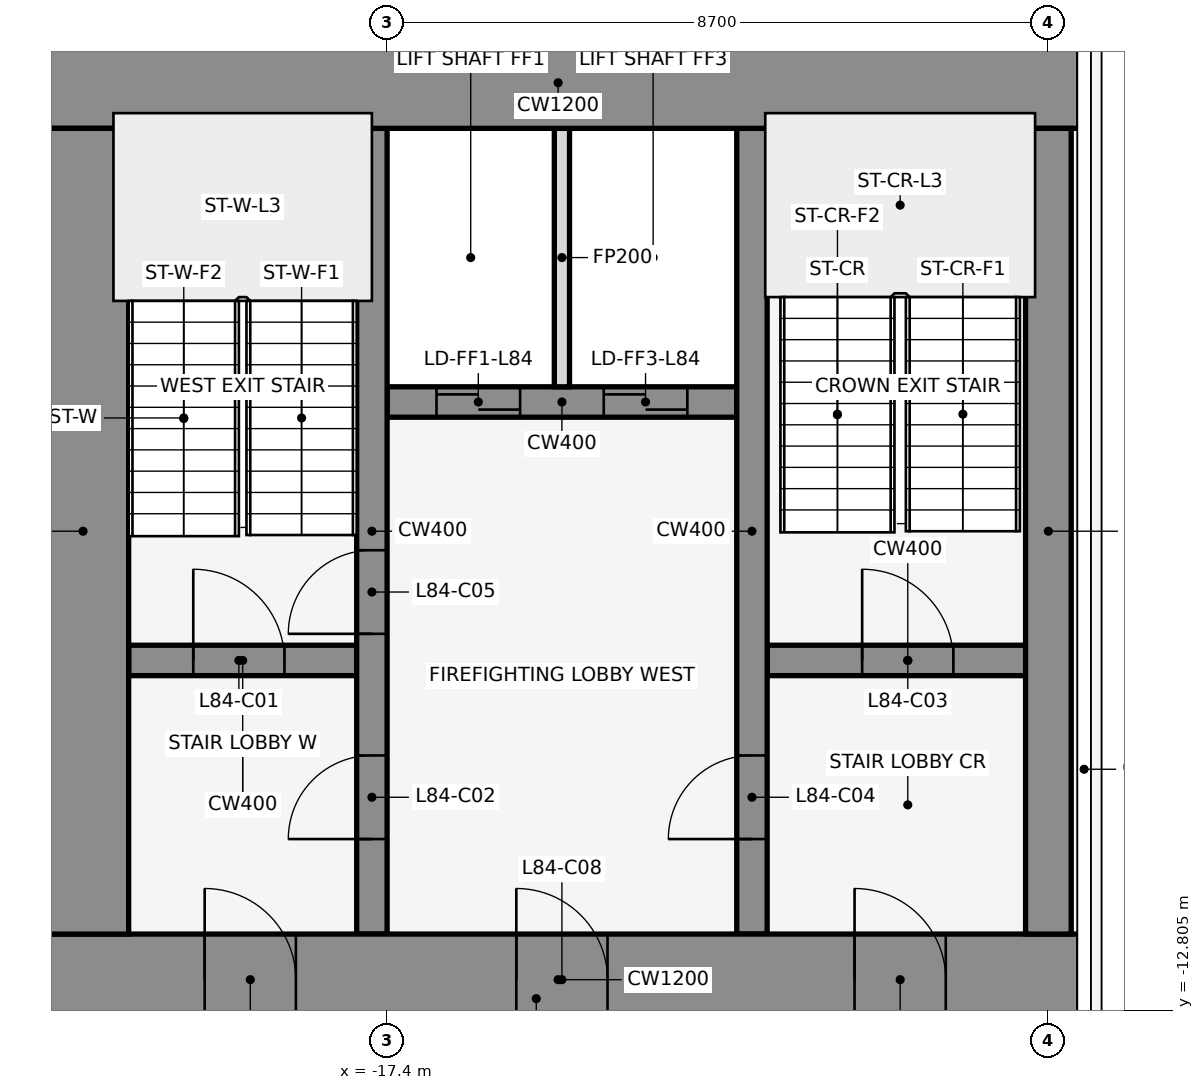
"""IFC4 building model, lengths in metres.
Left out: names, types, materials, properties, quantities, classifications, styles, units other than length and angle.
Written with IfcOpenShell. Run it as: python <this file> out.ifc"""

import sys

from ifc_helpers import new_model, si_unit, direction, frame, frame_2d, origin, place, context, subcontext, project, spatial, rectangle, extrude, element, fill, save


model = new_model("IFC4")
c1 = context("Model", 3, precision=1e-05, world=origin(), true_north=direction((0.0, 1.0)))
c2 = subcontext(c1, "Body", "Model", "MODEL_VIEW")
j1 = project(units=[si_unit("LENGTHUNIT", "METRE"), si_unit("PLANEANGLEUNIT", "RADIAN")], contexts=[c1])
p1 = place(None, origin())
s1 = spatial("IfcSite", under=j1, at=p1, CompositionType="ELEMENT")
p2 = place(p1, origin())
s2 = spatial("IfcBuilding", under=s1, at=p2, CompositionType="ELEMENT")
p3 = place(p2, frame((0.0, 0.0, 374.9)))
s3 = spatial("IfcBuildingStorey", under=s2, at=p3, CompositionType="ELEMENT", Elevation=374.9)
p4 = place(p3, frame((-20.8, -8.2, 0.0), z_axis=(0.0, 0.0, 1.0), x_axis=(1.0, 0.0, 0.0)))
e1 = element("IfcWall", 1, at=p4, inside=s3, PredefinedType="SHEAR", context=c2, shape_type="SweptSolid", body=[
    extrude(rectangle(XDim=3.0, YDim=0.4, at=frame_2d((1.5, 0.0))), origin(), (0.0, 0.0, 1.0), 4.5),
])
p5 = place(p4, frame((0.85, 0.0, 0.0)))
e2 = element("IfcOpeningElement", 2, at=p5, cuts=e1, PredefinedType="OPENING", context=c2, shape_type="SweptSolid", body=[
    extrude(rectangle(XDim=1.2, YDim=2.1, at=frame_2d((0.6, 1.05))), frame((0.0, 0.212, 0.0), z_axis=(0.0, -1.0, 0.0), x_axis=(1.0, 0.0, 0.0)), (0.0, 0.0, 1.0), 0.424),
])
p6 = place(p3, frame((-12.4, -8.2, 0.0), z_axis=(0.0, 0.0, 1.0), x_axis=(1.0, 0.0, 0.0)))
e3 = element("IfcWall", 3, at=p6, inside=s3, PredefinedType="SHEAR", context=c2, shape_type="SweptSolid", body=[
    extrude(rectangle(XDim=3.7, YDim=0.4, at=frame_2d((1.85, 0.0))), origin(), (0.0, 0.0, 1.0), 4.5),
])
p7 = place(p6, frame((1.25, 0.0, 0.0)))
e4 = element("IfcOpeningElement", 4, at=p7, cuts=e3, PredefinedType="OPENING", context=c2, shape_type="SweptSolid", body=[
    extrude(rectangle(XDim=1.2, YDim=2.1, at=frame_2d((0.6, 1.05))), frame((0.0, 0.212, 0.0), z_axis=(0.0, -1.0, 0.0), x_axis=(1.0, 0.0, 0.0)), (0.0, 0.0, 1.0), 0.424),
])
p8 = place(p3, frame((-17.4, -4.8, 0.0), z_axis=(0.0, 0.0, 1.0), x_axis=(1.0, 0.0, 0.0)))
e5 = element("IfcWall", 5, at=p8, inside=s3, PredefinedType="SHEAR", context=c2, shape_type="SweptSolid", body=[
    extrude(rectangle(XDim=4.6, YDim=0.4, at=frame_2d((2.3, 0.0))), origin(), (0.0, 0.0, 1.0), 4.5),
])
p9 = place(p8, frame((0.65, 0.0, 0.0)))
e6 = element("IfcOpeningElement", 6, at=p9, cuts=e5, PredefinedType="OPENING", context=c2, shape_type="SweptSolid", body=[
    extrude(rectangle(XDim=1.1, YDim=2.1, at=frame_2d((0.55, 1.05))), frame((0.0, 0.212, 0.0), z_axis=(0.0, -1.0, 0.0), x_axis=(1.0, 0.0, 0.0)), (0.0, 0.0, 1.0), 0.424),
])
p10 = place(p8, frame((2.85, 0.0, 0.0)))
e7 = element("IfcOpeningElement", 7, at=p10, cuts=e5, PredefinedType="OPENING", context=c2, shape_type="SweptSolid", body=[
    extrude(rectangle(XDim=1.1, YDim=2.1, at=frame_2d((0.55, 1.05))), frame((0.0, 0.212, 0.0), z_axis=(0.0, -1.0, 0.0), x_axis=(1.0, 0.0, 0.0)), (0.0, 0.0, 1.0), 0.424),
])
p11 = place(p3, frame((-17.6, -11.8, 0.0), z_axis=(0.0, 0.0, 1.0), x_axis=(0.0, 1.0, 0.0)))
e8 = element("IfcWall", 8, at=p11, inside=s3, PredefinedType="SHEAR", context=c2, shape_type="SweptSolid", body=[
    extrude(rectangle(XDim=10.6, YDim=0.4, at=frame_2d((5.3, 0.0))), origin(), (0.0, 0.0, 1.0), 4.5),
])
p12 = place(p11, frame((1.25, 0.0, 0.0)))
e9 = element("IfcOpeningElement", 9, at=p12, cuts=e8, PredefinedType="OPENING", context=c2, shape_type="SweptSolid", body=[
    extrude(rectangle(XDim=1.1, YDim=2.1, at=frame_2d((0.55, 1.05))), frame((0.0, 0.212, 0.0), z_axis=(0.0, -1.0, 0.0), x_axis=(1.0, 0.0, 0.0)), (0.0, 0.0, 1.0), 0.424),
])
p13 = place(p11, frame((3.95, 0.0, 0.0)))
e10 = element("IfcOpeningElement", 10, at=p13, cuts=e8, PredefinedType="OPENING", context=c2, shape_type="SweptSolid", body=[
    extrude(rectangle(XDim=1.1, YDim=2.1, at=frame_2d((0.55, 1.05))), frame((0.0, 0.212, 0.0), z_axis=(0.0, -1.0, 0.0), x_axis=(1.0, 0.0, 0.0)), (0.0, 0.0, 1.0), 0.424),
])
p14 = place(p3, frame((-15.1, -4.6, 0.0), z_axis=(0.0, 0.0, 1.0), x_axis=(0.0, 1.0, 0.0)))
e11 = element("IfcWall", 11, at=p14, inside=s3, PredefinedType="PARTITIONING", context=c2, shape_type="SweptSolid", body=[
    extrude(rectangle(XDim=3.4, YDim=0.2, at=frame_2d((1.7, 0.0))), origin(), (0.0, 0.0, 1.0), 3.368),
])
p15 = place(p3, frame((-12.6, -11.8, 0.0), z_axis=(0.0, 0.0, 1.0), x_axis=(0.0, 1.0, 0.0)))
e12 = element("IfcWall", 12, at=p15, inside=s3, PredefinedType="SHEAR", context=c2, shape_type="SweptSolid", body=[
    extrude(rectangle(XDim=10.6, YDim=0.4, at=frame_2d((5.3, 0.0))), origin(), (0.0, 0.0, 1.0), 4.5),
])
p16 = place(p15, frame((1.25, 0.0, 0.0)))
e13 = element("IfcOpeningElement", 13, at=p16, cuts=e12, PredefinedType="OPENING", context=c2, shape_type="SweptSolid", body=[
    extrude(rectangle(XDim=1.1, YDim=2.1, at=frame_2d((0.55, 1.05))), frame((0.0, 0.212, 0.0), z_axis=(0.0, -1.0, 0.0), x_axis=(1.0, 0.0, 0.0)), (0.0, 0.0, 1.0), 0.424),
])
p17 = place(p3, frame((-22.0, -0.6, 0.0), z_axis=(0.0, 0.0, 1.0), x_axis=(1.0, 0.0, 0.0)))
e14 = element("IfcWall", 14, at=p17, inside=s3, PredefinedType="SHEAR", context=c2, shape_type="SweptSolid", body=[
    extrude(rectangle(XDim=13.7, YDim=1.2, at=frame_2d((6.85, 0.0))), origin(), (0.0, 0.0, 1.0), 4.5),
])
p18 = place(p3, frame((-22.0, -12.4, 0.0), z_axis=(0.0, 0.0, 1.0), x_axis=(1.0, 0.0, 0.0)))
e15 = element("IfcWall", 15, at=p18, inside=s3, PredefinedType="SHEAR", context=c2, shape_type="SweptSolid", body=[
    extrude(rectangle(XDim=13.7, YDim=1.2, at=frame_2d((6.85, 0.0))), origin(), (0.0, 0.0, 1.0), 4.5),
])
p19 = place(p18, frame((2.2, 0.0, 0.0)))
e16 = element("IfcOpeningElement", 16, at=p19, cuts=e15, PredefinedType="OPENING", context=c2, shape_type="SweptSolid", body=[
    extrude(rectangle(XDim=1.2, YDim=2.1, at=frame_2d((0.6, 1.05))), frame((0.0, 0.612, 0.0), z_axis=(0.0, -1.0, 0.0), x_axis=(1.0, 0.0, 0.0)), (0.0, 0.0, 1.0), 1.224),
])
p20 = place(p18, frame((10.75, 0.0, 0.0)))
e17 = element("IfcOpeningElement", 17, at=p20, cuts=e15, PredefinedType="OPENING", context=c2, shape_type="SweptSolid", body=[
    extrude(rectangle(XDim=1.2, YDim=2.1, at=frame_2d((0.6, 1.05))), frame((0.0, 0.612, 0.0), z_axis=(0.0, -1.0, 0.0), x_axis=(1.0, 0.0, 0.0)), (0.0, 0.0, 1.0), 1.224),
])
p21 = place(p18, frame((6.3, 0.0, 0.0)))
e18 = element("IfcOpeningElement", 18, at=p21, cuts=e15, PredefinedType="OPENING", context=c2, shape_type="SweptSolid", body=[
    extrude(rectangle(XDim=1.2, YDim=2.1, at=frame_2d((0.6, 1.05))), frame((0.0, 0.612, 0.0), z_axis=(0.0, -1.0, 0.0), x_axis=(1.0, 0.0, 0.0)), (0.0, 0.0, 1.0), 1.224),
])
p22 = place(p3, frame((-21.4, -11.8, 0.0), z_axis=(0.0, 0.0, 1.0), x_axis=(0.0, 1.0, 0.0)))
e19 = element("IfcWall", 19, at=p22, inside=s3, PredefinedType="SHEAR", context=c2, shape_type="SweptSolid", body=[
    extrude(rectangle(XDim=10.6, YDim=1.2, at=frame_2d((5.3, 0.0))), origin(), (0.0, 0.0, 1.0), 4.5),
])
p23 = place(p3, frame((-8.7, -11.8, 0.0), z_axis=(0.0, 0.0, 1.0), x_axis=(0.0, 1.0, 0.0)))
e20 = element("IfcWall", 20, at=p23, inside=s3, PredefinedType="SHEAR", context=c2, shape_type="SweptSolid", body=[
    extrude(rectangle(XDim=10.6, YDim=0.6, at=frame_2d((5.3, 0.0))), origin(), (0.0, 0.0, 1.0), 4.5),
])
p24 = place(p5, origin())
e21 = element("IfcDoor", 21, at=p24, inside=s3, OperationType="SINGLE_SWING_LEFT", PredefinedType="DOOR", context=c2, shape_type="SweptSolid", body=[
    extrude(rectangle(XDim=1.2, YDim=2.1, at=frame_2d((0.6, 1.05))), frame((0.0, 0.025, 0.0), z_axis=(0.0, -1.0, 0.0), x_axis=(1.0, 0.0, 0.0)), (0.0, 0.0, 1.0), 0.05),
])
fill(e2, e21)
p25 = place(p12, frame((1.1, 0.0, 0.0), z_axis=(0.0, 0.0, 1.0), x_axis=(-1.0, 0.0, 0.0)))
e22 = element("IfcDoor", 22, at=p25, inside=s3, OperationType="SINGLE_SWING_LEFT", PredefinedType="DOOR", context=c2, shape_type="SweptSolid", body=[
    extrude(rectangle(XDim=1.1, YDim=2.1, at=frame_2d((0.55, 1.05))), frame((0.0, 0.025, 0.0), z_axis=(0.0, -1.0, 0.0), x_axis=(1.0, 0.0, 0.0)), (0.0, 0.0, 1.0), 0.05),
])
fill(e9, e22)
p26 = place(p7, origin())
e23 = element("IfcDoor", 23, at=p26, inside=s3, OperationType="SINGLE_SWING_LEFT", PredefinedType="DOOR", context=c2, shape_type="SweptSolid", body=[
    extrude(rectangle(XDim=1.2, YDim=2.1, at=frame_2d((0.6, 1.05))), frame((0.0, 0.025, 0.0), z_axis=(0.0, -1.0, 0.0), x_axis=(1.0, 0.0, 0.0)), (0.0, 0.0, 1.0), 0.05),
])
fill(e4, e23)
p27 = place(p16, origin())
e24 = element("IfcDoor", 24, at=p27, inside=s3, OperationType="SINGLE_SWING_RIGHT", PredefinedType="DOOR", context=c2, shape_type="SweptSolid", body=[
    extrude(rectangle(XDim=1.1, YDim=2.1, at=frame_2d((0.55, 1.05))), frame((0.0, 0.025, 0.0), z_axis=(0.0, -1.0, 0.0), x_axis=(1.0, 0.0, 0.0)), (0.0, 0.0, 1.0), 0.05),
])
fill(e13, e24)
p28 = place(p9, origin())
e25 = element("IfcDoor", 25, at=p28, inside=s3, OperationType="DOUBLE_DOOR_SLIDING", PredefinedType="DOOR", context=c2, shape_type="SweptSolid", body=[
    extrude(rectangle(XDim=1.1, YDim=2.1, at=frame_2d((0.55, 1.05))), frame((0.0, 0.025, 0.0), z_axis=(0.0, -1.0, 0.0), x_axis=(1.0, 0.0, 0.0)), (0.0, 0.0, 1.0), 0.05),
])
fill(e6, e25)
p29 = place(p10, origin())
e26 = element("IfcDoor", 26, at=p29, inside=s3, OperationType="DOUBLE_DOOR_SLIDING", PredefinedType="DOOR", context=c2, shape_type="SweptSolid", body=[
    extrude(rectangle(XDim=1.1, YDim=2.1, at=frame_2d((0.55, 1.05))), frame((0.0, 0.025, 0.0), z_axis=(0.0, -1.0, 0.0), x_axis=(1.0, 0.0, 0.0)), (0.0, 0.0, 1.0), 0.05),
])
fill(e7, e26)
p30 = place(p13, frame((1.1, 0.0, 0.0), z_axis=(0.0, 0.0, 1.0), x_axis=(-1.0, 0.0, 0.0)))
e27 = element("IfcDoor", 27, at=p30, inside=s3, OperationType="SINGLE_SWING_RIGHT", PredefinedType="DOOR", context=c2, shape_type="SweptSolid", body=[
    extrude(rectangle(XDim=1.1, YDim=2.1, at=frame_2d((0.55, 1.05))), frame((0.0, 0.025, 0.0), z_axis=(0.0, -1.0, 0.0), x_axis=(1.0, 0.0, 0.0)), (0.0, 0.0, 1.0), 0.05),
])
fill(e10, e27)
p31 = place(p19, frame((1.2, 0.0, 0.0), z_axis=(0.0, 0.0, 1.0), x_axis=(-1.0, 0.0, 0.0)))
e28 = element("IfcDoor", 28, at=p31, inside=s3, OperationType="SINGLE_SWING_RIGHT", PredefinedType="DOOR", context=c2, shape_type="SweptSolid", body=[
    extrude(rectangle(XDim=1.2, YDim=2.1, at=frame_2d((0.6, 1.05))), frame((0.0, 0.025, 0.0), z_axis=(0.0, -1.0, 0.0), x_axis=(1.0, 0.0, 0.0)), (0.0, 0.0, 1.0), 0.05),
])
fill(e16, e28)
p32 = place(p20, frame((1.2, 0.0, 0.0), z_axis=(0.0, 0.0, 1.0), x_axis=(-1.0, 0.0, 0.0)))
e29 = element("IfcDoor", 29, at=p32, inside=s3, OperationType="SINGLE_SWING_RIGHT", PredefinedType="DOOR", context=c2, shape_type="SweptSolid", body=[
    extrude(rectangle(XDim=1.2, YDim=2.1, at=frame_2d((0.6, 1.05))), frame((0.0, 0.025, 0.0), z_axis=(0.0, -1.0, 0.0), x_axis=(1.0, 0.0, 0.0)), (0.0, 0.0, 1.0), 0.05),
])
fill(e17, e29)
p33 = place(p21, frame((1.2, 0.0, 0.0), z_axis=(0.0, 0.0, 1.0), x_axis=(-1.0, 0.0, 0.0)))
e30 = element("IfcDoor", 30, at=p33, inside=s3, OperationType="SINGLE_SWING_RIGHT", PredefinedType="DOOR", context=c2, shape_type="SweptSolid", body=[
    extrude(rectangle(XDim=1.2, YDim=2.1, at=frame_2d((0.6, 1.05))), frame((0.0, 0.025, 0.0), z_axis=(0.0, -1.0, 0.0), x_axis=(1.0, 0.0, 0.0)), (0.0, 0.0, 1.0), 0.05),
])
fill(e18, e30)
save(model, sys.argv[1])
